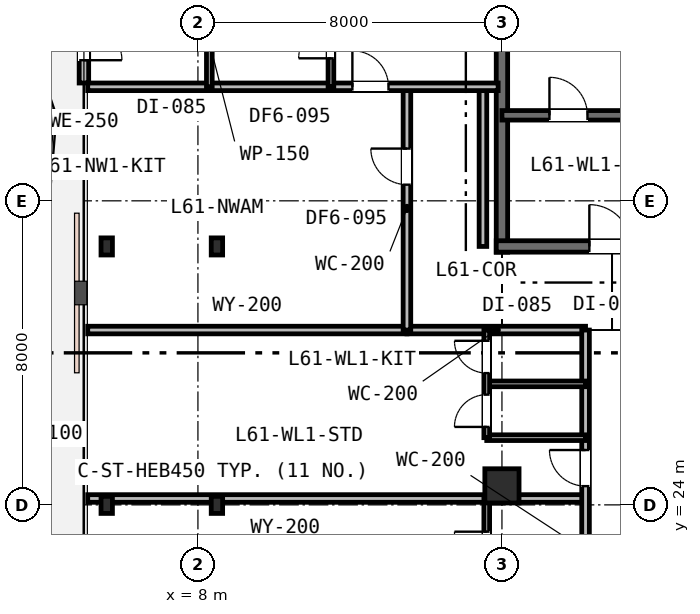
"""IFC4 building model, lengths in metres.
Left out: names, types, materials, properties, quantities, classifications, styles, units other than length and angle.
Written with IfcOpenShell. Run it as: python <this file> out.ifc"""

import sys

from ifc_helpers import new_model, si_unit, direction, frame, frame_2d, origin, origin_2d, place, context, subcontext, project, spatial, rectangle, i_section, extrude, element, fill, save


model = new_model("IFC4")
c1 = context("Model", 3, precision=1e-05, world=origin(), true_north=direction((0.0, 1.0)))
c2 = subcontext(c1, "Body", "Model", "MODEL_VIEW")
j1 = project(units=[si_unit("LENGTHUNIT", "METRE"), si_unit("PLANEANGLEUNIT", "RADIAN")], contexts=[c1])
p1 = place(None, origin())
s1 = spatial("IfcSite", under=j1, at=p1, CompositionType="ELEMENT")
p2 = place(p1, origin())
s2 = spatial("IfcBuilding", under=s1, at=p2, CompositionType="ELEMENT")
p3 = place(p2, frame((0.0, 0.0, 237.4)))
s3 = spatial("IfcBuildingStorey", under=s2, at=p3, CompositionType="ELEMENT", Elevation=237.4)
p4 = place(p3, frame((16.0, 30.65, 0.0), z_axis=(0.0, 0.0, 1.0), x_axis=(0.0, 1.0, 0.0)))
e1 = element("IfcWall", 1, at=p4, inside=s3, PredefinedType="SHEAR", context=c2, shape_type="SweptSolid", body=[
    extrude(rectangle(XDim=12.3, YDim=0.3, at=frame_2d((6.15, 0.0))), origin(), (0.0, 0.0, 1.0), 3.8),
])
p5 = place(p3, frame((15.85, 30.8, 0.0), z_axis=(0.0, 0.0, 1.0), x_axis=(1.0, 0.0, 0.0)))
e2 = element("IfcWall", 2, at=p5, inside=s3, PredefinedType="SHEAR", context=c2, shape_type="SweptSolid", body=[
    extrude(rectangle(XDim=11.2, YDim=0.3, at=frame_2d((5.6, 0.0))), origin(), (0.0, 0.0, 1.0), 3.8),
])
p6 = place(p5, frame((2.45, 0.0, 0.0)))
e3 = element("IfcOpeningElement", 3, at=p6, cuts=e2, PredefinedType="OPENING", context=c2, shape_type="SweptSolid", body=[
    extrude(rectangle(XDim=1.1, YDim=2.15, at=frame_2d((0.55, 1.075))), frame((0.0, 0.16, 0.0), z_axis=(0.0, -1.0, 0.0), x_axis=(1.0, 0.0, 0.0)), (0.0, 0.0, 1.0), 0.32),
])
p7 = place(p3, frame((16.0, 34.25, 0.0), z_axis=(0.0, 0.0, 1.0), x_axis=(1.0, 0.0, 0.0)))
e4 = element("IfcWall", 4, at=p7, inside=s3, PredefinedType="SHEAR", context=c2, shape_type="SweptSolid", body=[
    extrude(rectangle(XDim=6.05, YDim=0.25, at=frame_2d((3.025, 0.0))), origin(), (0.0, 0.0, 1.0), 3.8),
])
p8 = place(p7, frame((1.25, 0.0, 0.0)))
e5 = element("IfcOpeningElement", 5, at=p8, cuts=e4, PredefinedType="OPENING", context=c2, shape_type="SweptSolid", body=[
    extrude(rectangle(XDim=1.0, YDim=2.15, at=frame_2d((0.5, 1.075))), frame((0.0, 0.135, 0.0), z_axis=(0.0, -1.0, 0.0), x_axis=(1.0, 0.0, 0.0)), (0.0, 0.0, 1.0), 0.27),
])
p9 = place(p7, frame((4.2, 0.0, 0.0)))
e6 = element("IfcOpeningElement", 6, at=p9, cuts=e4, PredefinedType="OPENING", context=c2, shape_type="SweptSolid", body=[
    extrude(rectangle(XDim=1.1, YDim=2.15, at=frame_2d((0.55, 1.075))), frame((0.0, 0.135, 0.0), z_axis=(0.0, -1.0, 0.0), x_axis=(1.0, 0.0, 0.0)), (0.0, 0.0, 1.0), 0.27),
])
p10 = place(p3, frame((8.5, 24.0, 0.0), z_axis=(0.0, 0.0, 1.0), x_axis=(1.0, 0.0, 0.0)))
e7 = element("IfcColumn", 7, at=p10, inside=s3, PredefinedType="COLUMN", context=c2, shape_type="SweptSolid", body=[
    extrude(i_section(OverallWidth=0.3, OverallDepth=0.45, WebThickness=0.014, FlangeThickness=0.026, FilletRadius=0.027, at=origin_2d()), origin(), (0.0, 0.0, 1.0), 3.8),
])
p11 = place(p3, frame((16.0, 24.5, 0.0), z_axis=(0.0, 0.0, 1.0), x_axis=(1.0, 0.0, 0.0)))
e8 = element("IfcColumn", 8, at=p11, inside=s3, PredefinedType="COLUMN", context=c2, shape_type="SweptSolid", body=[
    extrude(rectangle(XDim=0.9, YDim=0.9, at=origin_2d()), origin(), (0.0, 0.0, 1.0), 3.8),
])
for number, where, z_axis, x_axis in (
    (9, (5.6, 24.0, 0.0), (0.0, 0.0, 1.0), (1.0, 0.0, 0.0)),
    (10, (5.6, 30.8, 0.0), (0.0, 0.0, 1.0), (1.0, 0.0, 0.0)),
    (11, (8.5, 30.8, 0.0), (0.0, 0.0, 1.0), (1.0, 0.0, 0.0)),
):
    element("IfcColumn", number, at=place(p3, frame(where, z_axis=z_axis, x_axis=x_axis)), inside=s3, PredefinedType="COLUMN", context=c2, shape_type="SweptSolid", body=[
        extrude(i_section(OverallWidth=0.3, OverallDepth=0.45, WebThickness=0.014, FlangeThickness=0.026, FilletRadius=0.027, at=origin_2d()), origin(), (0.0, 0.0, 1.0), 3.8),
    ])
p12 = place(p3, frame((5.0, 37.3, 0.0), z_axis=(0.0, 0.0, 1.0), x_axis=(0.0, -1.0, 0.0)))
e12 = element("IfcWall", 12, at=p12, inside=s3, PredefinedType="STANDARD", context=c2, shape_type="SweptSolid", body=[
    extrude(rectangle(XDim=2.2, YDim=0.25, at=frame_2d((1.1, 0.0))), origin(), (0.0, 0.0, 1.0), 3.53),
])
p13 = place(p12, frame((0.6, 0.0, 0.0)))
e13 = element("IfcOpeningElement", 13, at=p13, cuts=e12, PredefinedType="OPENING", context=c2, shape_type="SweptSolid", body=[
    extrude(rectangle(XDim=1.0, YDim=2.15, at=frame_2d((0.5, 1.075))), frame((0.0, 0.135, 0.0), z_axis=(0.0, -1.0, 0.0), x_axis=(1.0, 0.0, 0.0)), (0.0, 0.0, 1.0), 0.27),
])
p14 = place(p3, frame((5.1, 28.6, 0.0), z_axis=(0.0, 0.0, 1.0), x_axis=(1.0, 0.0, 0.0)))
e14 = element("IfcWall", 14, at=p14, inside=s3, PredefinedType="PARTITIONING", context=c2, shape_type="SweptSolid", body=[
    extrude(rectangle(XDim=8.4, YDim=0.2, at=frame_2d((4.2, 0.0))), origin(), (0.0, 0.0, 1.0), 2.92),
])
p15 = place(p3, frame((13.5, 28.6, 0.0), z_axis=(0.0, 0.0, 1.0), x_axis=(1.0, 0.0, 0.0)))
e15 = element("IfcWall", 15, at=p15, inside=s3, PredefinedType="PARTITIONING", context=c2, shape_type="SweptSolid", body=[
    extrude(rectangle(XDim=4.7, YDim=0.2, at=frame_2d((2.35, 0.0))), origin(), (0.0, 0.0, 1.0), 2.92),
])
p16 = place(p3, frame((15.5, 30.8, 0.0), z_axis=(0.0, 0.0, 1.0), x_axis=(0.0, 1.0, 0.0)))
e16 = element("IfcWall", 16, at=p16, inside=s3, PredefinedType="PARTITIONING", context=c2, shape_type="SweptSolid", body=[
    extrude(rectangle(XDim=4.2, YDim=0.2, at=frame_2d((2.1, 0.0))), origin(), (0.0, 0.0, 1.0), 2.92),
])
p17 = place(p3, frame((13.5, 28.6, 0.0), z_axis=(0.0, 0.0, 1.0), x_axis=(0.0, 1.0, 0.0)))
e17 = element("IfcWall", 17, at=p17, inside=s3, PredefinedType="PARTITIONING", context=c2, shape_type="SweptSolid", body=[
    extrude(rectangle(XDim=6.4, YDim=0.2, at=frame_2d((3.2, 0.0))), origin(), (0.0, 0.0, 1.0), 2.92),
])
p18 = place(p17, frame((3.825, 0.0, 0.0)))
e18 = element("IfcOpeningElement", 18, at=p18, cuts=e17, PredefinedType="OPENING", context=c2, shape_type="SweptSolid", body=[
    extrude(rectangle(XDim=0.95, YDim=2.15, at=frame_2d((0.475, 1.075))), frame((0.0, 0.11, 0.0), z_axis=(0.0, -1.0, 0.0), x_axis=(1.0, 0.0, 0.0)), (0.0, 0.0, 1.0), 0.22),
])
p19 = place(p3, frame((5.1, 35.0, 0.0), z_axis=(0.0, 0.0, 1.0), x_axis=(1.0, 0.0, 0.0)))
e19 = element("IfcWall", 19, at=p19, inside=s3, PredefinedType="PARTITIONING", context=c2, shape_type="SweptSolid", body=[
    extrude(rectangle(XDim=10.8, YDim=0.2, at=frame_2d((5.4, 0.0))), origin(), (0.0, 0.0, 1.0), 3.24),
])
p20 = place(p19, frame((6.964, 0.0, 0.0)))
e20 = element("IfcOpeningElement", 20, at=p20, cuts=e19, PredefinedType="OPENING", context=c2, shape_type="SweptSolid", body=[
    extrude(rectangle(XDim=0.95, YDim=2.15, at=frame_2d((0.475, 1.075))), frame((0.0, 0.11, 0.0), z_axis=(0.0, -1.0, 0.0), x_axis=(1.0, 0.0, 0.0)), (0.0, 0.0, 1.0), 0.22),
])
p21 = place(p3, frame((11.5, 35.0, 0.0), z_axis=(0.0, 0.0, 1.0), x_axis=(0.0, 1.0, 0.0)))
e21 = element("IfcWall", 21, at=p21, inside=s3, PredefinedType="PARTITIONING", context=c2, shape_type="SweptSolid", body=[
    extrude(rectangle(XDim=2.35, YDim=0.15, at=frame_2d((1.175, 0.0))), origin(), (0.0, 0.0, 1.0), 3.53),
])
p22 = place(p21, frame((0.75, 0.0, 0.0)))
e22 = element("IfcOpeningElement", 22, at=p22, cuts=e21, PredefinedType="OPENING", context=c2, shape_type="SweptSolid", body=[
    extrude(rectangle(XDim=0.85, YDim=2.15, at=frame_2d((0.425, 1.075))), frame((0.0, 0.085, 0.0), z_axis=(0.0, -1.0, 0.0), x_axis=(1.0, 0.0, 0.0)), (0.0, 0.0, 1.0), 0.17),
])
p23 = place(p3, frame((8.3, 35.0, 0.0), z_axis=(0.0, 0.0, 1.0), x_axis=(0.0, 1.0, 0.0)))
e23 = element("IfcWall", 23, at=p23, inside=s3, PredefinedType="PARTITIONING", context=c2, shape_type="SweptSolid", body=[
    extrude(rectangle(XDim=2.35, YDim=0.15, at=frame_2d((1.175, 0.0))), origin(), (0.0, 0.0, 1.0), 3.53),
])
p24 = place(p3, frame((5.1, 24.168, 0.0), z_axis=(0.0, 0.0, 1.0), x_axis=(1.0, 0.0, 0.0)))
e24 = element("IfcWall", 24, at=p24, inside=s3, PredefinedType="PARTITIONING", context=c2, shape_type="SweptSolid", body=[
    extrude(rectangle(XDim=13.1, YDim=0.2, at=frame_2d((6.55, 0.0))), origin(), (0.0, 0.0, 1.0), 2.92),
])
p25 = place(p3, frame((18.2, 17.0, 0.0), z_axis=(0.0, 0.0, 1.0), x_axis=(0.0, 1.0, 0.0)))
e25 = element("IfcWall", 25, at=p25, inside=s3, PredefinedType="PARTITIONING", context=c2, shape_type="SweptSolid", body=[
    extrude(rectangle(XDim=11.6, YDim=0.2, at=frame_2d((5.8, 0.0))), origin(), (0.0, 0.0, 1.0), 2.92),
])
p26 = place(p25, frame((7.493, 0.0, 0.0)))
e26 = element("IfcOpeningElement", 26, at=p26, cuts=e25, PredefinedType="OPENING", context=c2, shape_type="SweptSolid", body=[
    extrude(rectangle(XDim=0.95, YDim=2.15, at=frame_2d((0.475, 1.075))), frame((0.0, 0.11, 0.0), z_axis=(0.0, -1.0, 0.0), x_axis=(1.0, 0.0, 0.0)), (0.0, 0.0, 1.0), 0.22),
])
p27 = place(p25, frame((0.909, 0.0, 0.0)))
e27 = element("IfcOpeningElement", 27, at=p27, cuts=e25, PredefinedType="OPENING", context=c2, shape_type="SweptSolid", body=[
    extrude(rectangle(XDim=0.95, YDim=2.15, at=frame_2d((0.475, 1.075))), frame((0.0, 0.11, 0.0), z_axis=(0.0, -1.0, 0.0), x_axis=(1.0, 0.0, 0.0)), (0.0, 0.0, 1.0), 0.22),
])
for number, where, z_axis, x_axis in (
    (28, (15.6, 25.768, 0.0), (0.0, 0.0, 1.0), (1.0, 0.0, 0.0)),
    (29, (15.6, 27.184, 0.0), (0.0, 0.0, 1.0), (1.0, 0.0, 0.0)),
):
    element("IfcWall", number, at=place(p3, frame(where, z_axis=z_axis, x_axis=x_axis)), inside=s3, PredefinedType="PARTITIONING", context=c2, shape_type="SweptSolid", body=[
        extrude(rectangle(XDim=2.6, YDim=0.15, at=frame_2d((1.3, 0.0))), origin(), (0.0, 0.0, 1.0), 2.92),
    ])
p28 = place(p3, frame((15.6, 25.768, 0.0), z_axis=(0.0, 0.0, 1.0), x_axis=(0.0, 1.0, 0.0)))
e30 = element("IfcWall", 30, at=p28, inside=s3, PredefinedType="PARTITIONING", context=c2, shape_type="SweptSolid", body=[
    extrude(rectangle(XDim=2.832, YDim=0.15, at=frame_2d((1.416, 0.0))), origin(), (0.0, 0.0, 1.0), 2.92),
])
p29 = place(p28, frame((0.283, 0.0, 0.0)))
e31 = element("IfcOpeningElement", 31, at=p29, cuts=e30, PredefinedType="OPENING", context=c2, shape_type="SweptSolid", body=[
    extrude(rectangle(XDim=0.85, YDim=2.15, at=frame_2d((0.425, 1.075))), frame((0.0, 0.085, 0.0), z_axis=(0.0, -1.0, 0.0), x_axis=(1.0, 0.0, 0.0)), (0.0, 0.0, 1.0), 0.17),
])
p30 = place(p28, frame((1.699, 0.0, 0.0)))
e32 = element("IfcOpeningElement", 32, at=p30, cuts=e30, PredefinedType="OPENING", context=c2, shape_type="SweptSolid", body=[
    extrude(rectangle(XDim=0.85, YDim=2.15, at=frame_2d((0.425, 1.075))), frame((0.0, 0.085, 0.0), z_axis=(0.0, -1.0, 0.0), x_axis=(1.0, 0.0, 0.0)), (0.0, 0.0, 1.0), 0.17),
])
p31 = place(p3, frame((15.6, 19.768, 0.0), z_axis=(0.0, 0.0, 1.0), x_axis=(0.0, 1.0, 0.0)))
e33 = element("IfcWall", 33, at=p31, inside=s3, PredefinedType="PARTITIONING", context=c2, shape_type="SweptSolid", body=[
    extrude(rectangle(XDim=4.4, YDim=0.15, at=frame_2d((2.2, 0.0))), origin(), (0.0, 0.0, 1.0), 2.92),
])
p32 = place(p31, frame((0.675, 0.0, 0.0)))
e34 = element("IfcOpeningElement", 34, at=p32, cuts=e33, PredefinedType="OPENING", context=c2, shape_type="SweptSolid", body=[
    extrude(rectangle(XDim=0.85, YDim=2.15, at=frame_2d((0.425, 1.075))), frame((0.0, 0.085, 0.0), z_axis=(0.0, -1.0, 0.0), x_axis=(1.0, 0.0, 0.0)), (0.0, 0.0, 1.0), 0.17),
])
p33 = place(p31, frame((2.677, 0.0, 0.0)))
e35 = element("IfcOpeningElement", 35, at=p33, cuts=e33, PredefinedType="OPENING", context=c2, shape_type="SweptSolid", body=[
    extrude(rectangle(XDim=0.85, YDim=2.15, at=frame_2d((0.425, 1.075))), frame((0.0, 0.085, 0.0), z_axis=(0.0, -1.0, 0.0), x_axis=(1.0, 0.0, 0.0)), (0.0, 0.0, 1.0), 0.17),
])
p34 = place(p13, origin())
e36 = element("IfcDoor", 36, at=p34, inside=s3, OperationType="SINGLE_SWING_RIGHT", PredefinedType="DOOR", context=c2, shape_type="SweptSolid", body=[
    extrude(rectangle(XDim=1.0, YDim=2.15, at=frame_2d((0.5, 1.075))), frame((0.0, 0.025, 0.0), z_axis=(0.0, -1.0, 0.0), x_axis=(1.0, 0.0, 0.0)), (0.0, 0.0, 1.0), 0.05),
])
fill(e13, e36)
p35 = place(p8, origin())
e37 = element("IfcDoor", 37, at=p35, inside=s3, OperationType="SINGLE_SWING_LEFT", PredefinedType="DOOR", context=c2, shape_type="SweptSolid", body=[
    extrude(rectangle(XDim=1.0, YDim=2.15, at=frame_2d((0.5, 1.075))), frame((0.0, 0.025, 0.0), z_axis=(0.0, -1.0, 0.0), x_axis=(1.0, 0.0, 0.0)), (0.0, 0.0, 1.0), 0.05),
])
fill(e5, e37)
p36 = place(p6, origin())
e38 = element("IfcDoor", 38, at=p36, inside=s3, OperationType="SINGLE_SWING_LEFT", PredefinedType="DOOR", context=c2, shape_type="SweptSolid", body=[
    extrude(rectangle(XDim=1.1, YDim=2.15, at=frame_2d((0.55, 1.075))), frame((0.0, 0.025, 0.0), z_axis=(0.0, -1.0, 0.0), x_axis=(1.0, 0.0, 0.0)), (0.0, 0.0, 1.0), 0.05),
])
fill(e3, e38)
p37 = place(p18, origin())
e39 = element("IfcDoor", 39, at=p37, inside=s3, OperationType="SINGLE_SWING_RIGHT", PredefinedType="DOOR", context=c2, shape_type="SweptSolid", body=[
    extrude(rectangle(XDim=0.95, YDim=2.15, at=frame_2d((0.475, 1.075))), frame((0.0, 0.025, 0.0), z_axis=(0.0, -1.0, 0.0), x_axis=(1.0, 0.0, 0.0)), (0.0, 0.0, 1.0), 0.05),
])
fill(e18, e39)
p38 = place(p20, origin())
e40 = element("IfcDoor", 40, at=p38, inside=s3, OperationType="SINGLE_SWING_LEFT", PredefinedType="DOOR", context=c2, shape_type="SweptSolid", body=[
    extrude(rectangle(XDim=0.95, YDim=2.15, at=frame_2d((0.475, 1.075))), frame((0.0, 0.025, 0.0), z_axis=(0.0, -1.0, 0.0), x_axis=(1.0, 0.0, 0.0)), (0.0, 0.0, 1.0), 0.05),
])
fill(e20, e40)
p39 = place(p22, origin())
e41 = element("IfcDoor", 41, at=p39, inside=s3, OperationType="SINGLE_SWING_LEFT", PredefinedType="DOOR", context=c2, shape_type="SweptSolid", body=[
    extrude(rectangle(XDim=0.85, YDim=2.15, at=frame_2d((0.425, 1.075))), frame((0.0, 0.025, 0.0), z_axis=(0.0, -1.0, 0.0), x_axis=(1.0, 0.0, 0.0)), (0.0, 0.0, 1.0), 0.05),
])
fill(e22, e41)
p40 = place(p26, origin())
e42 = element("IfcDoor", 42, at=p40, inside=s3, OperationType="SINGLE_SWING_RIGHT", PredefinedType="DOOR", context=c2, shape_type="SweptSolid", body=[
    extrude(rectangle(XDim=0.95, YDim=2.15, at=frame_2d((0.475, 1.075))), frame((0.0, 0.025, 0.0), z_axis=(0.0, -1.0, 0.0), x_axis=(1.0, 0.0, 0.0)), (0.0, 0.0, 1.0), 0.05),
])
fill(e26, e42)
p41 = place(p29, origin())
e43 = element("IfcDoor", 43, at=p41, inside=s3, OperationType="SINGLE_SWING_LEFT", PredefinedType="DOOR", context=c2, shape_type="SweptSolid", body=[
    extrude(rectangle(XDim=0.85, YDim=2.15, at=frame_2d((0.425, 1.075))), frame((0.0, 0.025, 0.0), z_axis=(0.0, -1.0, 0.0), x_axis=(1.0, 0.0, 0.0)), (0.0, 0.0, 1.0), 0.05),
])
fill(e31, e43)
p42 = place(p30, origin())
e44 = element("IfcDoor", 44, at=p42, inside=s3, OperationType="SINGLE_SWING_RIGHT", PredefinedType="DOOR", context=c2, shape_type="SweptSolid", body=[
    extrude(rectangle(XDim=0.85, YDim=2.15, at=frame_2d((0.425, 1.075))), frame((0.0, 0.025, 0.0), z_axis=(0.0, -1.0, 0.0), x_axis=(1.0, 0.0, 0.0)), (0.0, 0.0, 1.0), 0.05),
])
fill(e32, e44)
p43 = place(p33, origin())
e45 = element("IfcDoor", 45, at=p43, inside=s3, OperationType="SINGLE_SWING_RIGHT", PredefinedType="DOOR", context=c2, shape_type="SweptSolid", body=[
    extrude(rectangle(XDim=0.85, YDim=2.15, at=frame_2d((0.425, 1.075))), frame((0.0, 0.025, 0.0), z_axis=(0.0, -1.0, 0.0), x_axis=(1.0, 0.0, 0.0)), (0.0, 0.0, 1.0), 0.05),
])
fill(e35, e45)
save(model, sys.argv[1])
